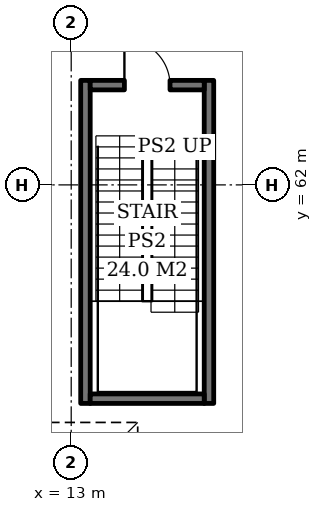
"""IFC4 building model, lengths in metres.
Left out: names, types, materials, properties, quantities, classifications, styles, units other than length and angle.
Written with IfcOpenShell. Run it as: python <this file> out.ifc"""

import sys

from ifc_helpers import new_model, si_unit, direction, frame, frame_2d, origin, place, context, subcontext, project, spatial, rectangle, extrude, element, fill, save


model = new_model("IFC4")
c1 = context("Model", 3, precision=1e-05, world=origin(), true_north=direction((0.0, 1.0)))
c2 = subcontext(c1, "Body", "Model", "MODEL_VIEW")
j1 = project(units=[si_unit("LENGTHUNIT", "METRE"), si_unit("PLANEANGLEUNIT", "RADIAN")], contexts=[c1])
p1 = place(None, origin())
s1 = spatial("IfcSite", under=j1, at=p1, CompositionType="ELEMENT")
p2 = place(p1, origin())
s2 = spatial("IfcBuilding", under=s1, at=p2, CompositionType="ELEMENT")
p3 = place(p2, frame((0.0, 0.0, -10.0)))
s3 = spatial("IfcBuildingStorey", under=s2, at=p3, CompositionType="ELEMENT", Elevation=-10.0)
for number, where, z_axis, x_axis in (
    (1, (13.375, 56.25, 0.0), (0.0, 0.0, 1.0), (0.0, 1.0, 0.0)),
    (2, (16.625, 56.25, 0.0), (0.0, 0.0, 1.0), (0.0, 1.0, 0.0)),
):
    element("IfcWall", number, at=place(p3, frame(where, z_axis=z_axis, x_axis=x_axis)), inside=s3, PredefinedType="SOLIDWALL", context=c2, shape_type="SweptSolid", body=[
        extrude(rectangle(XDim=8.5, YDim=0.25, at=frame_2d((4.25, 0.0))), origin(), (0.0, 0.0, 1.0), 4.7),
    ])
p4 = place(p3, frame((13.5, 56.375, 0.0), z_axis=(0.0, 0.0, 1.0), x_axis=(1.0, 0.0, 0.0)))
e3 = element("IfcWall", 3, at=p4, inside=s3, PredefinedType="SOLIDWALL", context=c2, shape_type="SweptSolid", body=[
    extrude(rectangle(XDim=3.0, YDim=0.25, at=frame_2d((1.5, 0.0))), origin(), (0.0, 0.0, 1.0), 4.7),
])
p5 = place(p3, frame((13.5, 64.625, 0.0), z_axis=(0.0, 0.0, 1.0), x_axis=(1.0, 0.0, 0.0)))
e4 = element("IfcWall", 4, at=p5, inside=s3, PredefinedType="SOLIDWALL", context=c2, shape_type="SweptSolid", body=[
    extrude(rectangle(XDim=3.0, YDim=0.25, at=frame_2d((1.5, 0.0))), origin(), (0.0, 0.0, 1.0), 4.7),
])
p6 = place(p5, frame((0.9, 0.0, 0.0)))
e5 = element("IfcOpeningElement", 5, at=p6, cuts=e4, PredefinedType="OPENING", context=c2, shape_type="SweptSolid", body=[
    extrude(rectangle(XDim=1.2, YDim=2.1, at=frame_2d((0.6, 1.05))), frame((0.0, 0.135, 0.0), z_axis=(0.0, -1.0, 0.0), x_axis=(1.0, 0.0, 0.0)), (0.0, 0.0, 1.0), 0.27),
])
p7 = place(p6, origin())
e6 = element("IfcDoor", 6, at=p7, inside=s3, OperationType="SINGLE_SWING_LEFT", PredefinedType="DOOR", context=c2, shape_type="SweptSolid", body=[
    extrude(rectangle(XDim=1.2, YDim=2.1, at=frame_2d((0.6, 1.05))), frame((0.0, 0.025, 0.0), z_axis=(0.0, -1.0, 0.0), x_axis=(1.0, 0.0, 0.0)), (0.0, 0.0, 1.0), 0.05),
])
fill(e5, e6)
save(model, sys.argv[1])
